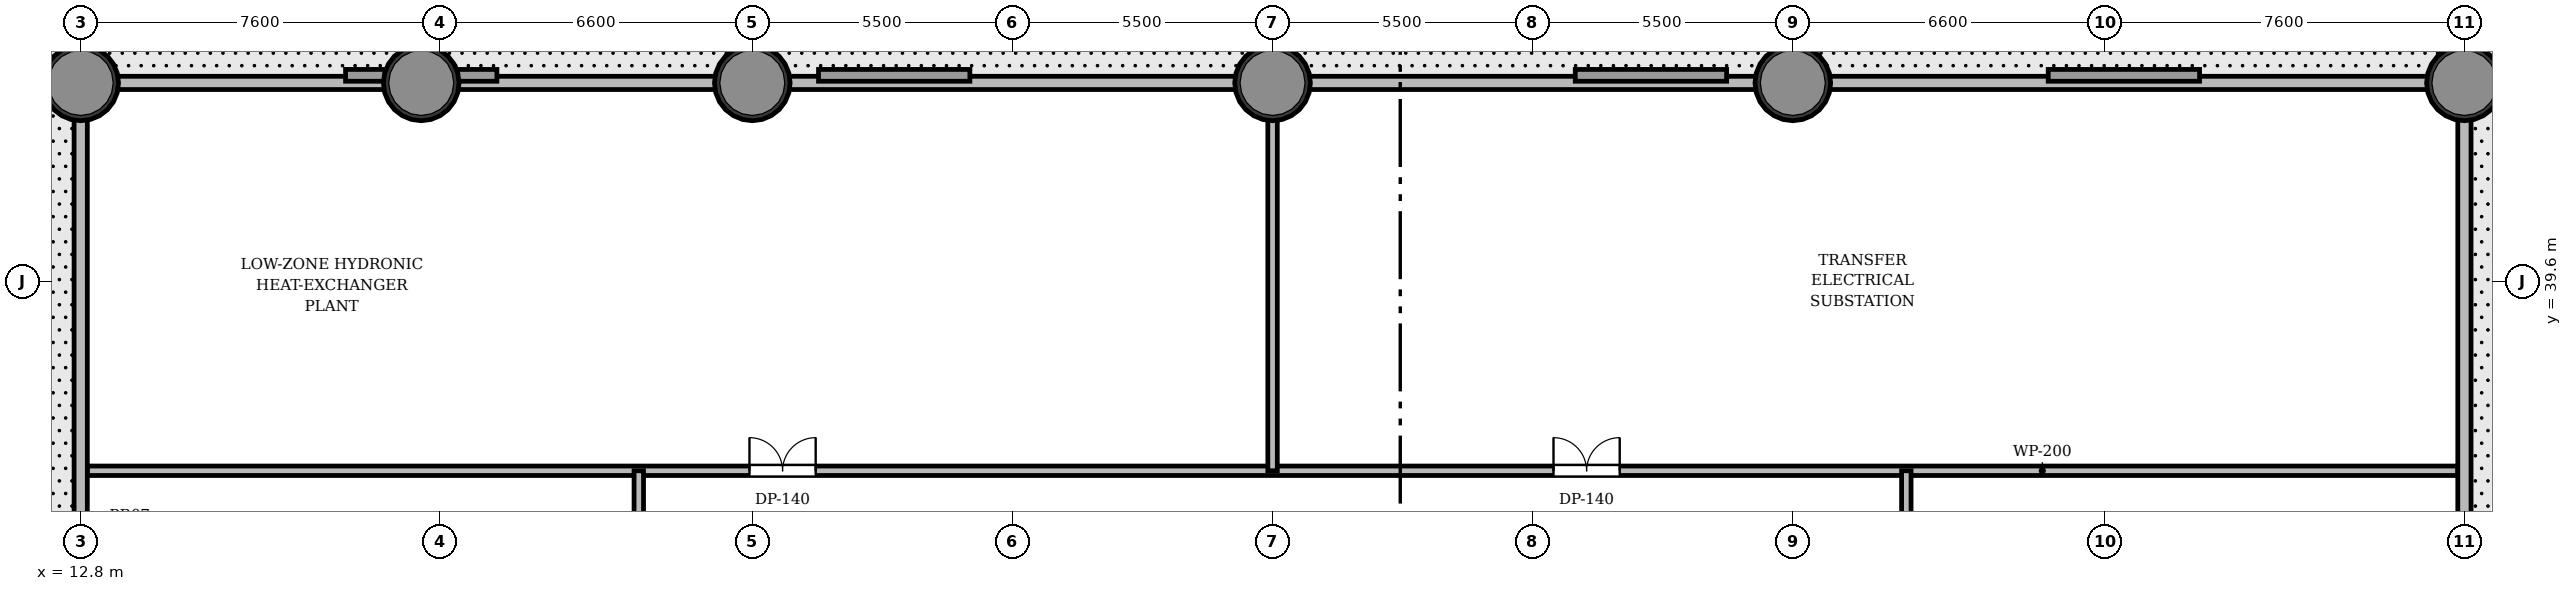
"""IFC4 building model, lengths in metres.
Left out: names, types, materials, properties, quantities, classifications, styles, units other than length and angle.
Written with IfcOpenShell. Run it as: python <this file> out.ifc"""

import sys

from ifc_helpers import new_model, si_unit, direction, frame, frame_2d, origin, origin_2d, place, context, subcontext, project, spatial, rectangle, hollow_circle, extrude, element, fill, save


model = new_model("IFC4")
c1 = context("Model", 3, precision=1e-05, world=origin(), true_north=direction((0.0, 1.0)))
c2 = subcontext(c1, "Body", "Model", "MODEL_VIEW")
j1 = project(units=[si_unit("LENGTHUNIT", "METRE"), si_unit("PLANEANGLEUNIT", "RADIAN")], contexts=[c1])
p1 = place(None, origin())
s1 = spatial("IfcSite", under=j1, at=p1, CompositionType="ELEMENT")
p2 = place(p1, origin())
s2 = spatial("IfcBuilding", under=s1, at=p2, CompositionType="ELEMENT")
p3 = place(p2, frame((0.0, 0.0, 35.4)))
s3 = spatial("IfcBuildingStorey", under=s2, at=p3, CompositionType="ELEMENT", Elevation=35.4)
for number, where, z_axis, x_axis in (
    (1, (12.8, 43.8, 0.0), (0.0, 0.0, 1.0), (1.0, 0.0, 0.0)),
    (2, (20.0, 43.8, 0.0), (0.0, 0.0, 1.0), (1.0, 0.0, 0.0)),
    (3, (27.0, 43.8, 0.0), (0.0, 0.0, 1.0), (1.0, 0.0, 0.0)),
    (4, (38.0, 43.8, 0.0), (0.0, 0.0, 1.0), (1.0, 0.0, 0.0)),
    (5, (49.0, 43.8, 0.0), (0.0, 0.0, 1.0), (1.0, 0.0, 0.0)),
    (6, (63.2, 43.8, 0.0), (0.0, 0.0, 1.0), (1.0, 0.0, 0.0)),
):
    element("IfcColumn", number, at=place(p3, frame(where, z_axis=z_axis, x_axis=x_axis)), inside=s3, PredefinedType="COLUMN", context=c2, shape_type="SweptSolid", body=[
        extrude(hollow_circle(Radius=0.8, WallThickness=0.06, at=origin_2d()), origin(), (0.0, 0.0, 1.0), 6.0),
    ])
p4 = place(p3, frame((12.94, 35.6, 0.0), z_axis=(0.0, 0.0, 1.0), x_axis=(1.0, 0.0, 0.0)))
e7 = element("IfcWall", 7, at=p4, inside=s3, PredefinedType="PARTITIONING", context=c2, shape_type="SweptSolid", body=[
    extrude(rectangle(XDim=50.12, YDim=0.2, at=frame_2d((25.06, 0.0))), origin(), (0.0, 0.0, 1.0), 4.81),
])
p5 = place(p4, frame((14.0, 0.0, 0.0)))
e8 = element("IfcOpeningElement", 8, at=p5, cuts=e7, PredefinedType="OPENING", context=c2, shape_type="SweptSolid", body=[
    extrude(rectangle(XDim=1.4, YDim=2.25, at=frame_2d((0.7, 1.125))), frame((0.0, 0.11, 0.0), z_axis=(0.0, -1.0, 0.0), x_axis=(1.0, 0.0, 0.0)), (0.0, 0.0, 1.0), 0.22),
])
p6 = place(p4, frame((31.0, 0.0, 0.0)))
e9 = element("IfcOpeningElement", 9, at=p6, cuts=e7, PredefinedType="OPENING", context=c2, shape_type="SweptSolid", body=[
    extrude(rectangle(XDim=1.4, YDim=2.25, at=frame_2d((0.7, 1.125))), frame((0.0, 0.11, 0.0), z_axis=(0.0, -1.0, 0.0), x_axis=(1.0, 0.0, 0.0)), (0.0, 0.0, 1.0), 0.22),
])
p7 = place(p3, frame((24.6, 14.5, 0.0), z_axis=(0.0, 0.0, 1.0), x_axis=(0.0, 1.0, 0.0)))
e10 = element("IfcWall", 10, at=p7, inside=s3, PredefinedType="PARTITIONING", context=c2, shape_type="SweptSolid", body=[
    extrude(rectangle(XDim=21.1, YDim=0.2, at=frame_2d((10.55, 0.0))), origin(), (0.0, 0.0, 1.0), 4.81),
])
p8 = place(p7, frame((5.0, 0.0, 0.0)))
e11 = element("IfcOpeningElement", 11, at=p8, cuts=e10, PredefinedType="OPENING", context=c2, shape_type="SweptSolid", body=[
    extrude(rectangle(XDim=1.4, YDim=2.25, at=frame_2d((0.7, 1.125))), frame((0.0, 0.11, 0.0), z_axis=(0.0, -1.0, 0.0), x_axis=(1.0, 0.0, 0.0)), (0.0, 0.0, 1.0), 0.22),
])
p9 = place(p3, frame((51.4, 14.5, 0.0), z_axis=(0.0, 0.0, 1.0), x_axis=(0.0, 1.0, 0.0)))
e12 = element("IfcWall", 12, at=p9, inside=s3, PredefinedType="PARTITIONING", context=c2, shape_type="SweptSolid", body=[
    extrude(rectangle(XDim=21.1, YDim=0.2, at=frame_2d((10.55, 0.0))), origin(), (0.0, 0.0, 1.0), 4.81),
])
p10 = place(p9, frame((5.0, 0.0, 0.0)))
e13 = element("IfcOpeningElement", 13, at=p10, cuts=e12, PredefinedType="OPENING", context=c2, shape_type="SweptSolid", body=[
    extrude(rectangle(XDim=1.4, YDim=2.25, at=frame_2d((0.7, 1.125))), frame((0.0, 0.11, 0.0), z_axis=(0.0, -1.0, 0.0), x_axis=(1.0, 0.0, 0.0)), (0.0, 0.0, 1.0), 0.22),
])
p11 = place(p3, frame((38.0, 35.6, 0.0), z_axis=(0.0, 0.0, 1.0), x_axis=(0.0, 1.0, 0.0)))
e14 = element("IfcWall", 14, at=p11, inside=s3, PredefinedType="PARTITIONING", context=c2, shape_type="SweptSolid", body=[
    extrude(rectangle(XDim=8.06, YDim=0.2, at=frame_2d((4.03, 0.0))), origin(), (0.0, 0.0, 1.0), 4.81),
])
p12 = place(p3, frame((12.8, 8.34, 0.0), z_axis=(0.0, 0.0, 1.0), x_axis=(0.0, 1.0, 0.0)))
e15 = element("IfcWall", 15, at=p12, inside=s3, PredefinedType="SOLIDWALL", context=c2, shape_type="SweptSolid", body=[
    extrude(rectangle(XDim=35.32, YDim=0.28, at=frame_2d((17.66, 0.0))), origin(), (0.0, 0.0, 1.0), 5.0),
])
p13 = place(p3, frame((12.8, 43.8, 0.0), z_axis=(0.0, 0.0, 1.0), x_axis=(1.0, 0.0, 0.0)))
e16 = element("IfcWall", 16, at=p13, inside=s3, PredefinedType="SOLIDWALL", context=c2, shape_type="SweptSolid", body=[
    extrude(rectangle(XDim=50.4, YDim=0.28, at=frame_2d((25.2, 0.0))), origin(), (0.0, 0.0, 1.0), 5.0),
])
p14 = place(p3, frame((63.2, 43.66, 0.0), z_axis=(0.0, 0.0, 1.0), x_axis=(0.0, -1.0, 0.0)))
e17 = element("IfcWall", 17, at=p14, inside=s3, PredefinedType="SOLIDWALL", context=c2, shape_type="SweptSolid", body=[
    extrude(rectangle(XDim=35.32, YDim=0.28, at=frame_2d((17.66, 0.0))), origin(), (0.0, 0.0, 1.0), 5.0),
])
p15 = place(p5, origin())
e18 = element("IfcDoor", 18, at=p15, inside=s3, OperationType="DOUBLE_DOOR_SINGLE_SWING", PredefinedType="DOOR", context=c2, shape_type="SweptSolid", body=[
    extrude(rectangle(XDim=1.4, YDim=2.25, at=frame_2d((0.7, 1.125))), frame((0.0, 0.025, 0.0), z_axis=(0.0, -1.0, 0.0), x_axis=(1.0, 0.0, 0.0)), (0.0, 0.0, 1.0), 0.05),
])
fill(e8, e18)
p16 = place(p6, origin())
e19 = element("IfcDoor", 19, at=p16, inside=s3, OperationType="DOUBLE_DOOR_SINGLE_SWING", PredefinedType="DOOR", context=c2, shape_type="SweptSolid", body=[
    extrude(rectangle(XDim=1.4, YDim=2.25, at=frame_2d((0.7, 1.125))), frame((0.0, 0.025, 0.0), z_axis=(0.0, -1.0, 0.0), x_axis=(1.0, 0.0, 0.0)), (0.0, 0.0, 1.0), 0.05),
])
fill(e9, e19)
save(model, sys.argv[1])
